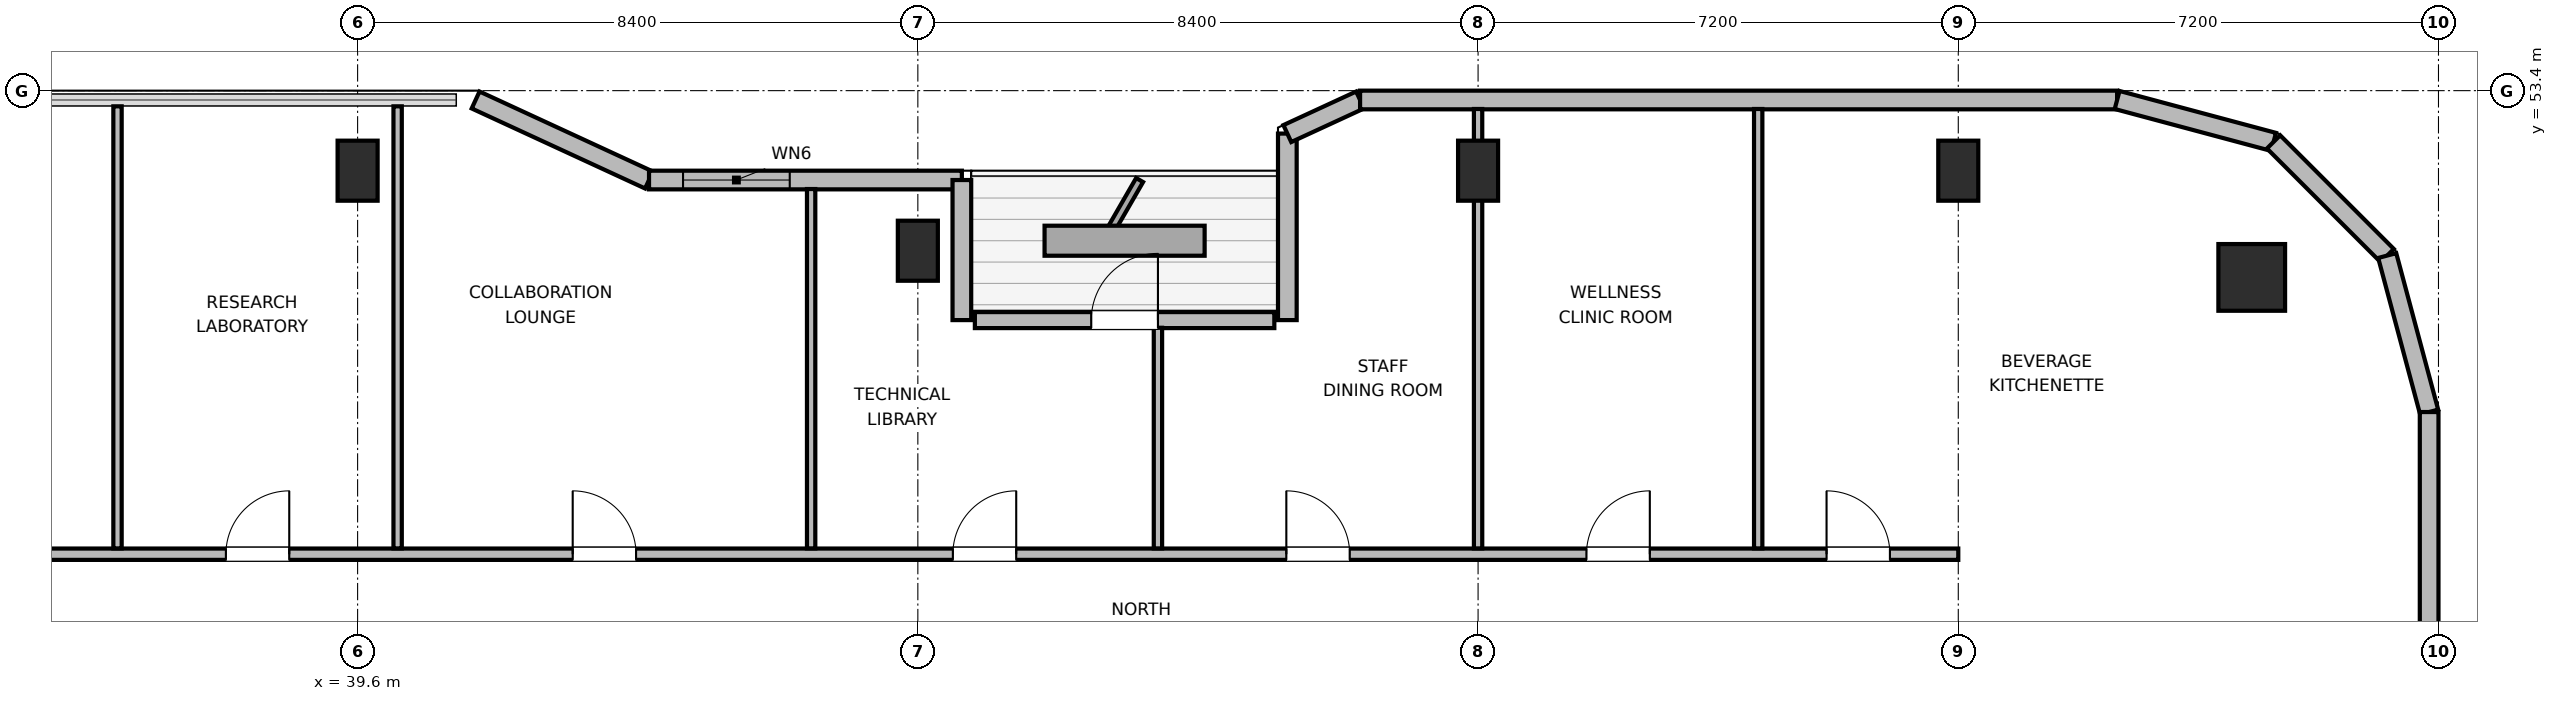
"""IFC4 building model, lengths in metres.
Left out: names, types, materials, properties, quantities, classifications, styles, units other than length and angle.
Written with IfcOpenShell. Run it as: python <this file> out.ifc"""

import sys

from ifc_helpers import new_model, si_unit, direction, frame, frame_2d, origin, origin_2d, place, context, subcontext, project, spatial, rectangle, circle, extrude, element, fill, save


model = new_model("IFC4")
c1 = context("Model", 3, precision=1e-05, world=origin(), true_north=direction((0.0, 1.0)))
c2 = subcontext(c1, "Body", "Model", "MODEL_VIEW")
j1 = project(units=[si_unit("LENGTHUNIT", "METRE"), si_unit("PLANEANGLEUNIT", "RADIAN")], contexts=[c1])
p1 = place(None, origin())
s1 = spatial("IfcSite", under=j1, at=p1, CompositionType="ELEMENT")
p2 = place(p1, origin())
s2 = spatial("IfcBuilding", under=s1, at=p2, CompositionType="ELEMENT")
p3 = place(p2, frame((0.0, 0.0, 278.4)))
s3 = spatial("IfcBuildingStorey", under=s2, at=p3, CompositionType="ELEMENT", Elevation=278.4)
p4 = place(p3, frame((68.0, 50.6, 0.0), z_axis=(0.0, 0.0, 1.0), x_axis=(1.0, 0.0, 0.0)))
e1 = element("IfcColumn", 1, at=p4, inside=s3, PredefinedType="COLUMN", context=c2, shape_type="SweptSolid", body=[
    extrude(circle(Radius=0.5, at=origin_2d()), origin(), (0.0, 0.0, 1.0), 3.9),
])
for number, where, z_axis, x_axis in (
    (2, (39.6, 52.2, 0.0), (0.0, 0.0, 1.0), (1.0, 0.0, 0.0)),
    (3, (48.0, 51.0, 0.0), (0.0, 0.0, 1.0), (1.0, 0.0, 0.0)),
    (4, (56.4, 52.2, 0.0), (0.0, 0.0, 1.0), (1.0, 0.0, 0.0)),
    (5, (63.6, 52.2, 0.0), (0.0, 0.0, 1.0), (1.0, 0.0, 0.0)),
):
    element("IfcColumn", number, at=place(p3, frame(where, z_axis=z_axis, x_axis=x_axis)), inside=s3, PredefinedType="COLUMN", context=c2, shape_type="SweptSolid", body=[
        extrude(rectangle(XDim=0.6, YDim=0.9, at=origin_2d()), origin(), (0.0, 0.0, 1.0), 3.9),
    ])
p5 = place(p3, frame((41.369, 53.26, 0.0), z_axis=(0.0, 0.0, 1.0), x_axis=(0.907956889006, -0.419063584324, 0.0)))
e6 = element("IfcWall", 6, at=p5, inside=s3, PredefinedType="SOLIDWALL", context=c2, shape_type="SweptSolid", body=[
    extrude(rectangle(XDim=2.864, YDim=0.28, at=frame_2d((1.432, 0.0))), origin(), (0.0, 0.0, 1.0), 2.185),
])
p6 = place(p3, frame((43.969, 52.06, 0.0), z_axis=(0.0, 0.0, 1.0), x_axis=(1.0, 0.0, 0.0)))
e7 = element("IfcWall", 7, at=p6, inside=s3, PredefinedType="SOLIDWALL", context=c2, shape_type="SweptSolid", body=[
    extrude(rectangle(XDim=4.691, YDim=0.28, at=frame_2d((2.345, 0.0))), origin(), (0.0, 0.0, 1.0), 2.185),
])
p7 = place(p6, frame((0.51, 0.0, 0.85)))
e8 = element("IfcOpeningElement", 8, at=p7, cuts=e7, PredefinedType="OPENING", context=c2, shape_type="SweptSolid", body=[
    extrude(rectangle(XDim=1.6, YDim=1.0, at=frame_2d((0.8, 0.5))), frame((0.0, 0.15, 0.0), z_axis=(0.0, -1.0, 0.0), x_axis=(1.0, 0.0, 0.0)), (0.0, 0.0, 1.0), 0.3),
])
p8 = place(p3, frame((48.66, 52.06, 0.0), z_axis=(0.0, 0.0, 1.0), x_axis=(0.0, -1.0, 0.0)))
e9 = element("IfcWall", 9, at=p8, inside=s3, PredefinedType="SOLIDWALL", context=c2, shape_type="SweptSolid", body=[
    extrude(rectangle(XDim=2.1, YDim=0.28, at=frame_2d((1.05, 0.0))), origin(), (0.0, 0.0, 1.0), 2.185),
])
p9 = place(p3, frame((48.855, 49.96, 0.0), z_axis=(0.0, 0.0, 1.0), x_axis=(1.0, 0.0, 0.0)))
e10 = element("IfcWall", 10, at=p9, inside=s3, PredefinedType="SOLIDWALL", context=c2, shape_type="SweptSolid", body=[
    extrude(rectangle(XDim=4.49, YDim=0.24, at=frame_2d((2.245, 0.0))), origin(), (0.0, 0.0, 1.0), 3.6),
])
p10 = place(p9, frame((1.745, 0.0, 0.0)))
e11 = element("IfcOpeningElement", 11, at=p10, cuts=e10, PredefinedType="OPENING", context=c2, shape_type="SweptSolid", body=[
    extrude(rectangle(XDim=1.0, YDim=2.02, at=frame_2d((0.5, 1.01))), frame((0.0, 0.13, 0.0), z_axis=(0.0, -1.0, 0.0), x_axis=(1.0, 0.0, 0.0)), (0.0, 0.0, 1.0), 0.26),
])
p11 = place(p3, frame((53.54, 49.96, 0.0), z_axis=(0.0, 0.0, 1.0), x_axis=(0.0, 1.0, 0.0)))
e12 = element("IfcWall", 12, at=p11, inside=s3, PredefinedType="SOLIDWALL", context=c2, shape_type="SweptSolid", body=[
    extrude(rectangle(XDim=2.796, YDim=0.28, at=frame_2d((1.398, 0.0))), origin(), (0.0, 0.0, 1.0), 2.185),
])
p12 = place(p3, frame((53.54, 52.756, 0.0), z_axis=(0.0, 0.0, 1.0), x_axis=(0.907893953211, 0.419199916176, 0.0)))
e13 = element("IfcWall", 13, at=p12, inside=s3, PredefinedType="SOLIDWALL", context=c2, shape_type="SweptSolid", body=[
    extrude(rectangle(XDim=1.201, YDim=0.28, at=frame_2d((0.601, 0.0))), origin(), (0.0, 0.0, 1.0), 3.6),
])
p13 = place(p3, frame((54.631, 53.26, 0.0), z_axis=(0.0, 0.0, 1.0), x_axis=(1.0, 0.0, 0.0)))
e14 = element("IfcWall", 14, at=p13, inside=s3, PredefinedType="SOLIDWALL", context=c2, shape_type="SweptSolid", body=[
    extrude(rectangle(XDim=11.351, YDim=0.28, at=frame_2d((5.675, 0.0))), origin(), (0.0, 0.0, 1.0), 3.6),
])
p14 = place(p3, frame((65.982, 53.26, 0.0), z_axis=(0.0, 0.0, 1.0), x_axis=(0.965937282298, -0.25877628691, 0.0)))
e15 = element("IfcWall", 15, at=p14, inside=s3, PredefinedType="SOLIDWALL", context=c2, shape_type="SweptSolid", body=[
    extrude(rectangle(XDim=2.428, YDim=0.28, at=frame_2d((1.214, 0.0))), origin(), (0.0, 0.0, 1.0), 3.6),
])
p15 = place(p3, frame((68.327, 52.632, 0.0), z_axis=(0.0, 0.0, 1.0), x_axis=(0.707106781187, -0.707106781187, 0.0)))
e16 = element("IfcWall", 16, at=p15, inside=s3, PredefinedType="SOLIDWALL", context=c2, shape_type="SweptSolid", body=[
    extrude(rectangle(XDim=2.41, YDim=0.28, at=frame_2d((1.205, 0.0))), origin(), (0.0, 0.0, 1.0), 3.6),
])
p16 = place(p3, frame((70.031, 50.927, 0.0), z_axis=(0.0, 0.0, 1.0), x_axis=(0.258751159445, -0.965944013639, 0.0)))
e17 = element("IfcWall", 17, at=p16, inside=s3, PredefinedType="SOLIDWALL", context=c2, shape_type="SweptSolid", body=[
    extrude(rectangle(XDim=2.429, YDim=0.28, at=frame_2d((1.214, 0.0))), origin(), (0.0, 0.0, 1.0), 3.6),
])
p17 = place(p3, frame((70.66, 48.582, 0.0), z_axis=(0.0, 0.0, 1.0), x_axis=(0.0, -1.0, 0.0)))
e18 = element("IfcWall", 18, at=p17, inside=s3, PredefinedType="SOLIDWALL", context=c2, shape_type="SweptSolid", body=[
    extrude(rectangle(XDim=5.842, YDim=0.28, at=frame_2d((2.921, 0.0))), origin(), (0.0, 0.0, 1.0), 3.6),
])
p18 = place(p3, frame((30.35, 46.45, 0.0), z_axis=(0.0, 0.0, 1.0), x_axis=(1.0, 0.0, 0.0)))
e19 = element("IfcWall", 19, at=p18, inside=s3, PredefinedType="PARTITIONING", context=c2, shape_type="SweptSolid", body=[
    extrude(rectangle(XDim=33.25, YDim=0.17, at=frame_2d((16.625, 0.0))), origin(), (0.0, 0.0, 1.0), 3.6),
])
p19 = place(p18, frame((2.35, 0.0, 0.0)))
e20 = element("IfcOpeningElement", 20, at=p19, cuts=e19, PredefinedType="OPENING", context=c2, shape_type="SweptSolid", body=[
    extrude(rectangle(XDim=0.95, YDim=2.04, at=frame_2d((0.475, 1.02))), frame((0.0, 0.095, 0.0), z_axis=(0.0, -1.0, 0.0), x_axis=(1.0, 0.0, 0.0)), (0.0, 0.0, 1.0), 0.19),
])
p20 = place(p18, frame((7.275, 0.0, 0.0)))
e21 = element("IfcOpeningElement", 21, at=p20, cuts=e19, PredefinedType="OPENING", context=c2, shape_type="SweptSolid", body=[
    extrude(rectangle(XDim=0.95, YDim=2.04, at=frame_2d((0.475, 1.02))), frame((0.0, 0.095, 0.0), z_axis=(0.0, -1.0, 0.0), x_axis=(1.0, 0.0, 0.0)), (0.0, 0.0, 1.0), 0.19),
])
p21 = place(p18, frame((12.475, 0.0, 0.0)))
e22 = element("IfcOpeningElement", 22, at=p21, cuts=e19, PredefinedType="OPENING", context=c2, shape_type="SweptSolid", body=[
    extrude(rectangle(XDim=0.95, YDim=2.04, at=frame_2d((0.475, 1.02))), frame((0.0, 0.095, 0.0), z_axis=(0.0, -1.0, 0.0), x_axis=(1.0, 0.0, 0.0)), (0.0, 0.0, 1.0), 0.19),
])
p22 = place(p18, frame((18.175, 0.0, 0.0)))
e23 = element("IfcOpeningElement", 23, at=p22, cuts=e19, PredefinedType="OPENING", context=c2, shape_type="SweptSolid", body=[
    extrude(rectangle(XDim=0.95, YDim=2.04, at=frame_2d((0.475, 1.02))), frame((0.0, 0.095, 0.0), z_axis=(0.0, -1.0, 0.0), x_axis=(1.0, 0.0, 0.0)), (0.0, 0.0, 1.0), 0.19),
])
p23 = place(p18, frame((23.175, 0.0, 0.0)))
e24 = element("IfcOpeningElement", 24, at=p23, cuts=e19, PredefinedType="OPENING", context=c2, shape_type="SweptSolid", body=[
    extrude(rectangle(XDim=0.95, YDim=2.04, at=frame_2d((0.475, 1.02))), frame((0.0, 0.095, 0.0), z_axis=(0.0, -1.0, 0.0), x_axis=(1.0, 0.0, 0.0)), (0.0, 0.0, 1.0), 0.19),
])
p24 = place(p18, frame((27.675, 0.0, 0.0)))
e25 = element("IfcOpeningElement", 25, at=p24, cuts=e19, PredefinedType="OPENING", context=c2, shape_type="SweptSolid", body=[
    extrude(rectangle(XDim=0.95, YDim=2.04, at=frame_2d((0.475, 1.02))), frame((0.0, 0.095, 0.0), z_axis=(0.0, -1.0, 0.0), x_axis=(1.0, 0.0, 0.0)), (0.0, 0.0, 1.0), 0.19),
])
p25 = place(p18, frame((31.275, 0.0, 0.0)))
e26 = element("IfcOpeningElement", 26, at=p25, cuts=e19, PredefinedType="OPENING", context=c2, shape_type="SweptSolid", body=[
    extrude(rectangle(XDim=0.95, YDim=2.04, at=frame_2d((0.475, 1.02))), frame((0.0, 0.095, 0.0), z_axis=(0.0, -1.0, 0.0), x_axis=(1.0, 0.0, 0.0)), (0.0, 0.0, 1.0), 0.19),
])
p26 = place(p3, frame((36.0, 46.537, 0.0), z_axis=(0.0, 0.0, 1.0), x_axis=(0.0, 1.0, 0.0)))
e27 = element("IfcWall", 27, at=p26, inside=s3, PredefinedType="PARTITIONING", context=c2, shape_type="SweptSolid", body=[
    extrude(rectangle(XDim=6.628, YDim=0.125, at=frame_2d((3.314, 0.0))), origin(), (0.0, 0.0, 1.0), 3.6),
])
p27 = place(p3, frame((40.2, 46.537, 0.0), z_axis=(0.0, 0.0, 1.0), x_axis=(0.0, 1.0, 0.0)))
e28 = element("IfcWall", 28, at=p27, inside=s3, PredefinedType="PARTITIONING", context=c2, shape_type="SweptSolid", body=[
    extrude(rectangle(XDim=6.628, YDim=0.125, at=frame_2d((3.314, 0.0))), origin(), (0.0, 0.0, 1.0), 2.963),
])
p28 = place(p3, frame((46.4, 46.537, 0.0), z_axis=(0.0, 0.0, 1.0), x_axis=(0.0, 1.0, 0.0)))
e29 = element("IfcWall", 29, at=p28, inside=s3, PredefinedType="PARTITIONING", context=c2, shape_type="SweptSolid", body=[
    extrude(rectangle(XDim=5.388, YDim=0.125, at=frame_2d((2.694, 0.0))), origin(), (0.0, 0.0, 1.0), 3.6),
])
p29 = place(p3, frame((51.6, 46.537, 0.0), z_axis=(0.0, 0.0, 1.0), x_axis=(0.0, 1.0, 0.0)))
e30 = element("IfcWall", 30, at=p29, inside=s3, PredefinedType="PARTITIONING", context=c2, shape_type="SweptSolid", body=[
    extrude(rectangle(XDim=3.308, YDim=0.125, at=frame_2d((1.654, 0.0))), origin(), (0.0, 0.0, 1.0), 3.6),
])
p30 = place(p3, frame((56.4, 46.537, 0.0), z_axis=(0.0, 0.0, 1.0), x_axis=(0.0, 1.0, 0.0)))
e31 = element("IfcWall", 31, at=p30, inside=s3, PredefinedType="PARTITIONING", context=c2, shape_type="SweptSolid", body=[
    extrude(rectangle(XDim=6.588, YDim=0.125, at=frame_2d((3.294, 0.0))), origin(), (0.0, 0.0, 1.0), 2.963),
])
p31 = place(p3, frame((60.6, 46.537, 0.0), z_axis=(0.0, 0.0, 1.0), x_axis=(0.0, 1.0, 0.0)))
e32 = element("IfcWall", 32, at=p31, inside=s3, PredefinedType="PARTITIONING", context=c2, shape_type="SweptSolid", body=[
    extrude(rectangle(XDim=6.588, YDim=0.125, at=frame_2d((3.294, 0.0))), origin(), (0.0, 0.0, 1.0), 3.6),
])
p32 = place(p7, origin())
e33 = element("IfcWindow", 33, at=p32, inside=s3, PartitioningType="SINGLE_PANEL", PredefinedType="WINDOW", context=c2, shape_type="SweptSolid", body=[
    extrude(rectangle(XDim=1.6, YDim=1.0, at=frame_2d((0.8, 0.5))), frame((0.0, 0.03, 0.0), z_axis=(0.0, -1.0, 0.0), x_axis=(1.0, 0.0, 0.0)), (0.0, 0.0, 1.0), 0.06),
])
fill(e8, e33)
p33 = place(p10, origin())
e34 = element("IfcDoor", 34, at=p33, inside=s3, OperationType="SINGLE_SWING_RIGHT", PredefinedType="DOOR", context=c2, shape_type="SweptSolid", body=[
    extrude(rectangle(XDim=1.0, YDim=2.02, at=frame_2d((0.5, 1.01))), frame((0.0, 0.025, 0.0), z_axis=(0.0, -1.0, 0.0), x_axis=(1.0, 0.0, 0.0)), (0.0, 0.0, 1.0), 0.05),
])
fill(e11, e34)
p34 = place(p20, origin())
e35 = element("IfcDoor", 35, at=p34, inside=s3, OperationType="SINGLE_SWING_RIGHT", PredefinedType="DOOR", context=c2, shape_type="SweptSolid", body=[
    extrude(rectangle(XDim=0.95, YDim=2.04, at=frame_2d((0.475, 1.02))), frame((0.0, 0.025, 0.0), z_axis=(0.0, -1.0, 0.0), x_axis=(1.0, 0.0, 0.0)), (0.0, 0.0, 1.0), 0.05),
])
fill(e21, e35)
p35 = place(p21, origin())
e36 = element("IfcDoor", 36, at=p35, inside=s3, OperationType="SINGLE_SWING_LEFT", PredefinedType="DOOR", context=c2, shape_type="SweptSolid", body=[
    extrude(rectangle(XDim=0.95, YDim=2.04, at=frame_2d((0.475, 1.02))), frame((0.0, 0.025, 0.0), z_axis=(0.0, -1.0, 0.0), x_axis=(1.0, 0.0, 0.0)), (0.0, 0.0, 1.0), 0.05),
])
fill(e22, e36)
p36 = place(p22, origin())
e37 = element("IfcDoor", 37, at=p36, inside=s3, OperationType="SINGLE_SWING_RIGHT", PredefinedType="DOOR", context=c2, shape_type="SweptSolid", body=[
    extrude(rectangle(XDim=0.95, YDim=2.04, at=frame_2d((0.475, 1.02))), frame((0.0, 0.025, 0.0), z_axis=(0.0, -1.0, 0.0), x_axis=(1.0, 0.0, 0.0)), (0.0, 0.0, 1.0), 0.05),
])
fill(e23, e37)
p37 = place(p23, origin())
e38 = element("IfcDoor", 38, at=p37, inside=s3, OperationType="SINGLE_SWING_LEFT", PredefinedType="DOOR", context=c2, shape_type="SweptSolid", body=[
    extrude(rectangle(XDim=0.95, YDim=2.04, at=frame_2d((0.475, 1.02))), frame((0.0, 0.025, 0.0), z_axis=(0.0, -1.0, 0.0), x_axis=(1.0, 0.0, 0.0)), (0.0, 0.0, 1.0), 0.05),
])
fill(e24, e38)
p38 = place(p24, origin())
e39 = element("IfcDoor", 39, at=p38, inside=s3, OperationType="SINGLE_SWING_RIGHT", PredefinedType="DOOR", context=c2, shape_type="SweptSolid", body=[
    extrude(rectangle(XDim=0.95, YDim=2.04, at=frame_2d((0.475, 1.02))), frame((0.0, 0.025, 0.0), z_axis=(0.0, -1.0, 0.0), x_axis=(1.0, 0.0, 0.0)), (0.0, 0.0, 1.0), 0.05),
])
fill(e25, e39)
p39 = place(p25, origin())
e40 = element("IfcDoor", 40, at=p39, inside=s3, OperationType="SINGLE_SWING_LEFT", PredefinedType="DOOR", context=c2, shape_type="SweptSolid", body=[
    extrude(rectangle(XDim=0.95, YDim=2.04, at=frame_2d((0.475, 1.02))), frame((0.0, 0.025, 0.0), z_axis=(0.0, -1.0, 0.0), x_axis=(1.0, 0.0, 0.0)), (0.0, 0.0, 1.0), 0.05),
])
fill(e26, e40)
save(model, sys.argv[1])
